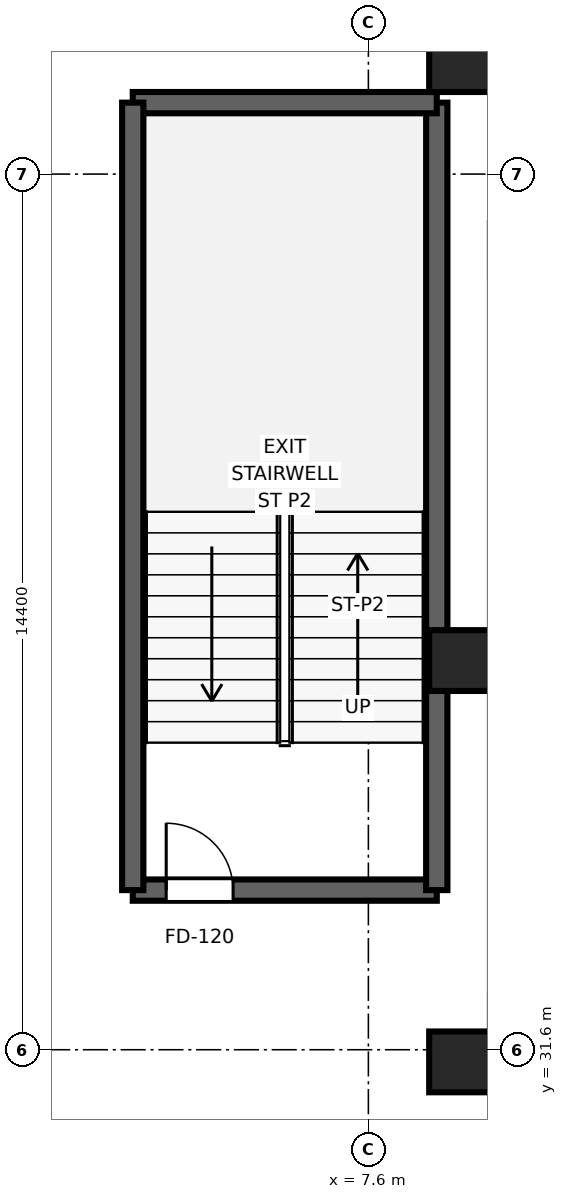
"""IFC4 building model, lengths in metres.
Left out: names, types, materials, properties, quantities, classifications, styles, units other than length and angle.
Written with IfcOpenShell. Run it as: python <this file> out.ifc"""

import sys

from ifc_helpers import new_model, si_unit, direction, frame, frame_2d, origin, origin_2d, place, context, subcontext, project, spatial, rectangle, extrude, source, transform, mapped, element, fill, save


model = new_model("IFC4")
c1 = context("Model", 3, precision=1e-05, world=origin(), true_north=direction((0.0, 1.0)))
c2 = subcontext(c1, "Body", "Model", "MODEL_VIEW")
j1 = project(units=[si_unit("LENGTHUNIT", "METRE"), si_unit("PLANEANGLEUNIT", "RADIAN")], contexts=[c1])
p1 = place(None, origin())
s1 = spatial("IfcSite", under=j1, at=p1, CompositionType="ELEMENT")
p2 = place(p1, origin())
s2 = spatial("IfcBuilding", under=s1, at=p2, CompositionType="ELEMENT")
p3 = place(p2, frame((0.0, 0.0, 22.4)))
s3 = spatial("IfcBuildingStorey", under=s2, at=p3, CompositionType="ELEMENT", Elevation=22.4)
p4 = place(p3, frame((3.725, 34.225, 0.0), z_axis=(0.0, 0.0, 1.0), x_axis=(1.0, 0.0, 0.0)))
e1 = element("IfcWall", 1, at=p4, inside=s3, PredefinedType="SHEAR", context=c2, shape_type="SweptSolid", body=[
    extrude(rectangle(XDim=5.0, YDim=0.35, at=frame_2d((2.5, 0.0))), origin(), (0.0, 0.0, 1.0), 4.4),
])
p5 = place(p4, frame((0.55, 0.0, 0.0)))
e2 = element("IfcOpeningElement", 2, at=p5, cuts=e1, PredefinedType="OPENING", context=c2, shape_type="SweptSolid", body=[
    extrude(rectangle(XDim=1.1, YDim=2.12, at=frame_2d((0.55, 1.06))), frame((0.0, 0.185, 0.0), z_axis=(0.0, -1.0, 0.0), x_axis=(1.0, 0.0, 0.0)), (0.0, 0.0, 1.0), 0.37),
])
p6 = place(p3, frame((8.725, 34.225, 0.0), z_axis=(0.0, 0.0, 1.0), x_axis=(0.0, 1.0, 0.0)))
e3 = element("IfcWall", 3, at=p6, inside=s3, PredefinedType="SHEAR", context=c2, shape_type="SweptSolid", body=[
    extrude(rectangle(XDim=12.95, YDim=0.35, at=frame_2d((6.475, 0.0))), origin(), (0.0, 0.0, 1.0), 4.4),
])
p7 = place(p3, frame((8.725, 47.175, 0.0), z_axis=(0.0, 0.0, 1.0), x_axis=(-1.0, 0.0, 0.0)))
e4 = element("IfcWall", 4, at=p7, inside=s3, PredefinedType="SHEAR", context=c2, shape_type="SweptSolid", body=[
    extrude(rectangle(XDim=5.0, YDim=0.35, at=frame_2d((2.5, 0.0))), origin(), (0.0, 0.0, 1.0), 4.4),
])
p8 = place(p3, frame((3.725, 47.175, 0.0), z_axis=(0.0, 0.0, 1.0), x_axis=(0.0, -1.0, 0.0)))
e5 = element("IfcWall", 5, at=p8, inside=s3, PredefinedType="SHEAR", context=c2, shape_type="SweptSolid", body=[
    extrude(rectangle(XDim=12.95, YDim=0.35, at=frame_2d((6.475, 0.0))), origin(), (0.0, 0.0, 1.0), 4.4),
])
m1 = source(origin(), c2, "Body", "SweptSolid", [
    extrude(rectangle(XDim=1.0, YDim=1.0, at=origin_2d()), origin(), (0.0, 0.0, 1.0), 4.4),
])
for number, where, z_axis, x_axis in (
    (6, (9.1, 47.85, 0.0), (0.0, 0.0, 1.0), (1.0, 0.0, 0.0)),
    (7, (9.1, 38.0, 0.0), (0.0, 0.0, 1.0), (1.0, 0.0, 0.0)),
    (8, (9.1, 31.4, 0.0), (0.0, 0.0, 1.0), (1.0, 0.0, 0.0)),
):
    element("IfcColumn", number, at=place(p3, frame(where, z_axis=z_axis, x_axis=x_axis)), inside=s3, PredefinedType="COLUMN", context=c2, shape_type="MappedRepresentation", body=[
        mapped(m1, transform((0.0, 0.0, 0.0), x_axis=(1.0, 0.0, 0.0), y_axis=(0.0, 1.0, 0.0), z_axis=(0.0, 0.0, 1.0), scale=1.0)),
    ])
m2 = source(origin(), c2, "Body", "SweptSolid", [
    extrude(rectangle(XDim=1.1, YDim=2.12, at=frame_2d((0.55, 1.06))), frame((0.0, 0.025, 0.0), z_axis=(0.0, -1.0, 0.0), x_axis=(1.0, 0.0, 0.0)), (0.0, 0.0, 1.0), 0.05),
])
p9 = place(p5, origin())
e9 = element("IfcDoor", 9, at=p9, inside=s3, OperationType="SINGLE_SWING_LEFT", PredefinedType="DOOR", context=c2, shape_type="MappedRepresentation", body=[
    mapped(m2, transform((0.0, 0.0, 0.0), x_axis=(1.0, 0.0, 0.0), y_axis=(0.0, 1.0, 0.0), z_axis=(0.0, 0.0, 1.0), scale=1.0)),
])
fill(e2, e9)
save(model, sys.argv[1])
